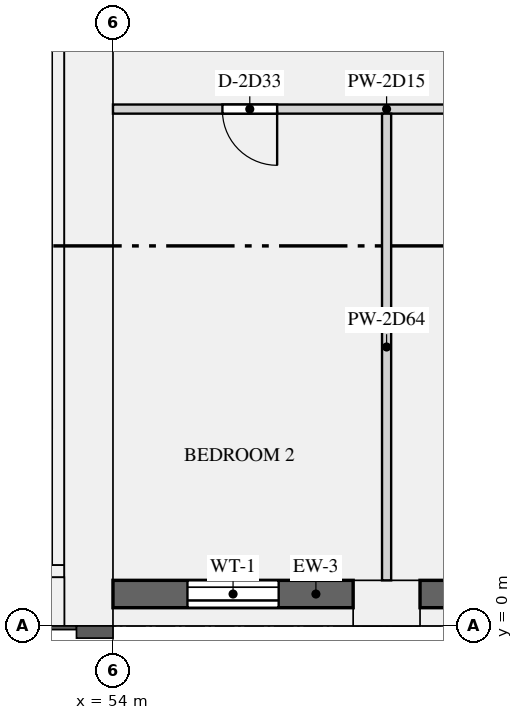
"""IFC4 building model, lengths in metres.
Left out: names, types, materials, properties, quantities, classifications, styles, units other than length and angle.
Written with IfcOpenShell. Run it as: python <this file> out.ifc"""

import sys

from ifc_helpers import new_model, si_unit, direction, frame, frame_2d, origin, origin_2d, place, context, subcontext, project, spatial, rectangle, extrude, element, fill, save


model = new_model("IFC4")
c1 = context("Model", 3, precision=1e-05, world=origin(), true_north=direction((0.0, 1.0)))
c2 = subcontext(c1, "Body", "Model", "MODEL_VIEW")
j1 = project(units=[si_unit("LENGTHUNIT", "METRE"), si_unit("PLANEANGLEUNIT", "RADIAN")], contexts=[c1])
p1 = place(None, origin())
s1 = spatial("IfcSite", under=j1, at=p1, CompositionType="ELEMENT")
p2 = place(p1, origin())
s2 = spatial("IfcBuilding", under=s1, at=p2, CompositionType="ELEMENT")
p3 = place(p2, frame((0.0, 0.0, 111.9)))
s3 = spatial("IfcBuildingStorey", under=s2, at=p3, CompositionType="ELEMENT", Elevation=111.9)
p4 = place(p3, frame((58.5, 0.375, 0.0), z_axis=(0.0, 0.0, 1.0), x_axis=(1.0, 0.0, 0.0)))
e1 = element("IfcColumn", 1, at=p4, inside=s3, PredefinedType="USERDEFINED", context=c2, shape_type="SweptSolid", body=[
    extrude(rectangle(XDim=1.1, YDim=0.75, at=origin_2d()), origin(), (0.0, 0.0, 1.0), 3.15),
])
p5 = place(p3, frame((53.6, 0.0, 0.0), z_axis=(0.0, 0.0, 1.0), x_axis=(0.0, 1.0, 0.0)))
e2 = element("IfcWall", 2, at=p5, inside=s3, PredefinedType="SHEAR", context=c2, shape_type="SweptSolid", body=[
    extrude(rectangle(XDim=12.5, YDim=0.8, at=frame_2d((6.25, 0.0))), origin(), (0.0, 0.0, 1.0), 3.15),
])
p6 = place(p3, frame((18.8, 0.4, 0.0), z_axis=(0.0, 0.0, 1.0), x_axis=(1.0, 0.0, 0.0)))
e3 = element("IfcWall", 3, at=p6, inside=s3, PredefinedType="SHEAR", context=c2, shape_type="SweptSolid", body=[
    extrude(rectangle(XDim=34.4, YDim=0.8, at=frame_2d((17.2, 0.0))), origin(), (0.0, 0.0, 1.0), 3.15),
])
p7 = place(p3, frame((53.1, 1.0, 0.0), z_axis=(0.0, 0.0, 1.0), x_axis=(0.0, 1.0, 0.0)))
e4 = element("IfcWall", 4, at=p7, inside=s3, PredefinedType="SHEAR", context=c2, shape_type="SweptSolid", body=[
    extrude(rectangle(XDim=10.9, YDim=0.2, at=frame_2d((5.45, 0.0))), origin(), (0.0, 0.0, 1.0), 3.15),
])
p8 = place(p3, frame((18.8, 0.9, 0.0), z_axis=(0.0, 0.0, 1.0), x_axis=(1.0, 0.0, 0.0)))
e5 = element("IfcWall", 5, at=p8, inside=s3, PredefinedType="SHEAR", context=c2, shape_type="SweptSolid", body=[
    extrude(rectangle(XDim=34.4, YDim=0.2, at=frame_2d((17.2, 0.0))), origin(), (0.0, 0.0, 1.0), 3.15),
])
p9 = place(p3, frame((54.0, 0.525, 0.9), z_axis=(0.0, 0.0, 1.0), x_axis=(1.0, 0.0, 0.0)))
e6 = element("IfcWall", 6, at=p9, inside=s3, PredefinedType="SOLIDWALL", context=c2, shape_type="SweptSolid", body=[
    extrude(rectangle(XDim=3.95, YDim=0.45, at=frame_2d((1.975, 0.0))), origin(), (0.0, 0.0, 1.0), 1.93),
])
p10 = place(p9, frame((1.225, 0.0, 0.15)))
e7 = element("IfcOpeningElement", 7, at=p10, cuts=e6, PredefinedType="OPENING", context=c2, shape_type="SweptSolid", body=[
    extrude(rectangle(XDim=1.5, YDim=1.5, at=frame_2d((0.75, 0.75))), frame((0.0, 0.235, 0.0), z_axis=(0.0, -1.0, 0.0), x_axis=(1.0, 0.0, 0.0)), (0.0, 0.0, 1.0), 0.47),
])
p11 = place(p3, frame((59.05, 0.525, 0.9), z_axis=(0.0, 0.0, 1.0), x_axis=(1.0, 0.0, 0.0)))
e8 = element("IfcWall", 8, at=p11, inside=s3, PredefinedType="SOLIDWALL", context=c2, shape_type="SweptSolid", body=[
    extrude(rectangle(XDim=3.4, YDim=0.45, at=frame_2d((1.7, 0.0))), origin(), (0.0, 0.0, 1.0), 1.93),
])
p12 = place(p11, frame((0.95, 0.0, 0.15)))
e9 = element("IfcOpeningElement", 9, at=p12, cuts=e8, PredefinedType="OPENING", context=c2, shape_type="SweptSolid", body=[
    extrude(rectangle(XDim=1.5, YDim=1.5, at=frame_2d((0.75, 0.75))), frame((0.0, 0.235, 0.0), z_axis=(0.0, -1.0, 0.0), x_axis=(1.0, 0.0, 0.0)), (0.0, 0.0, 1.0), 0.47),
])
p13 = place(p3, frame((54.0, 8.5, 0.0), z_axis=(0.0, 0.0, 1.0), x_axis=(1.0, 0.0, 0.0)))
e10 = element("IfcWall", 10, at=p13, inside=s3, PredefinedType="PARTITIONING", context=c2, shape_type="SweptSolid", body=[
    extrude(rectangle(XDim=8.925, YDim=0.15, at=frame_2d((4.462, 0.0))), origin(), (0.0, 0.0, 1.0), 2.83),
])
p14 = place(p13, frame((1.8, 0.0, 0.0)))
e11 = element("IfcOpeningElement", 11, at=p14, cuts=e10, PredefinedType="OPENING", context=c2, shape_type="SweptSolid", body=[
    extrude(rectangle(XDim=0.9, YDim=2.1, at=frame_2d((0.45, 1.05))), frame((0.0, 0.085, 0.0), z_axis=(0.0, -1.0, 0.0), x_axis=(1.0, 0.0, 0.0)), (0.0, 0.0, 1.0), 0.17),
])
p15 = place(p13, frame((6.3, 0.0, 0.0)))
e12 = element("IfcOpeningElement", 12, at=p15, cuts=e10, PredefinedType="OPENING", context=c2, shape_type="SweptSolid", body=[
    extrude(rectangle(XDim=0.9, YDim=2.1, at=frame_2d((0.45, 1.05))), frame((0.0, 0.085, 0.0), z_axis=(0.0, -1.0, 0.0), x_axis=(1.0, 0.0, 0.0)), (0.0, 0.0, 1.0), 0.17),
])
p16 = place(p3, frame((58.5, 0.75, 0.0), z_axis=(0.0, 0.0, 1.0), x_axis=(0.0, 1.0, 0.0)))
e13 = element("IfcWall", 13, at=p16, inside=s3, PredefinedType="PARTITIONING", context=c2, shape_type="SweptSolid", body=[
    extrude(rectangle(XDim=7.675, YDim=0.15, at=frame_2d((3.837, 0.0))), origin(), (0.0, 0.0, 1.0), 2.83),
])
p17 = place(p10, origin())
e14 = element("IfcWindow", 14, at=p17, inside=s3, PartitioningType="SINGLE_PANEL", PredefinedType="WINDOW", context=c2, shape_type="SweptSolid", body=[
    extrude(rectangle(XDim=1.5, YDim=1.5, at=frame_2d((0.75, 0.75))), frame((0.0, -0.065, 0.0), z_axis=(0.0, -1.0, 0.0), x_axis=(1.0, 0.0, 0.0)), (0.0, 0.0, 1.0), 0.06),
])
fill(e7, e14)
p18 = place(p14, frame((0.9, 0.0, 0.0), z_axis=(0.0, 0.0, 1.0), x_axis=(-1.0, 0.0, 0.0)))
e15 = element("IfcDoor", 15, at=p18, inside=s3, OperationType="SINGLE_SWING_LEFT", PredefinedType="DOOR", context=c2, shape_type="SweptSolid", body=[
    extrude(rectangle(XDim=0.9, YDim=2.1, at=frame_2d((0.45, 1.05))), frame((0.0, 0.025, 0.0), z_axis=(0.0, -1.0, 0.0), x_axis=(1.0, 0.0, 0.0)), (0.0, 0.0, 1.0), 0.05),
])
fill(e11, e15)
save(model, sys.argv[1])
